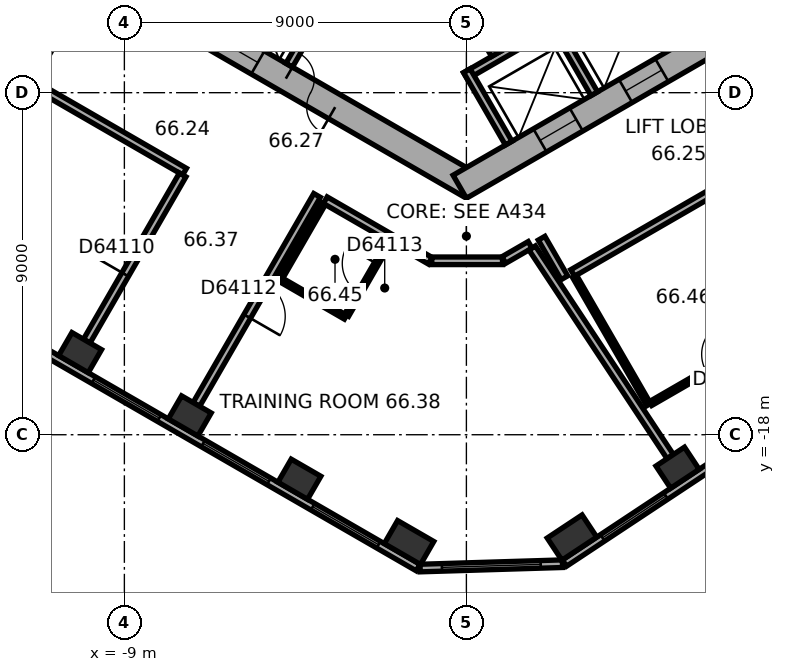
"""IFC4 building model, lengths in metres.
Left out: names, types, materials, properties, quantities, classifications, styles, units other than length and angle.
Written with IfcOpenShell. Run it as: python <this file> out.ifc"""

import sys

from ifc_helpers import new_model, si_unit, direction, frame, frame_2d, origin, origin_2d, place, context, subcontext, project, spatial, rectangle, extrude, element, fill, save


model = new_model("IFC4")
c1 = context("Model", 3, precision=1e-05, world=origin(), true_north=direction((0.0, 1.0)))
c2 = subcontext(c1, "Body", "Model", "MODEL_VIEW")
j1 = project(units=[si_unit("LENGTHUNIT", "METRE"), si_unit("PLANEANGLEUNIT", "RADIAN")], contexts=[c1])
p1 = place(None, origin())
s1 = spatial("IfcSite", under=j1, at=p1, CompositionType="ELEMENT")
p2 = place(p1, origin())
s2 = spatial("IfcBuilding", under=s1, at=p2, CompositionType="ELEMENT")
p3 = place(p2, frame((0.0, 0.0, 267.2)))
s3 = spatial("IfcBuildingStorey", under=s2, at=p3, CompositionType="ELEMENT", Elevation=267.2)
for number, where, z_axis, x_axis in (
    (1, (-10.165, -15.84, 0.0), (0.0, 0.0, 1.0), (0.866, -0.5, 0.0)),
    (2, (-7.28, -17.505, 0.0), (0.0, 0.0, 1.0), (0.866, -0.5, 0.0)),
    (3, (-4.395, -19.171, 0.0), (0.0, 0.0, 1.0), (0.866, -0.5, 0.0)),
):
    element("IfcColumn", number, at=place(p3, frame(where, z_axis=z_axis, x_axis=x_axis)), inside=s3, PredefinedType="COLUMN", context=c2, shape_type="SweptSolid", body=[
        extrude(rectangle(XDim=0.9, YDim=0.7, at=origin_2d()), origin(), (0.0, 0.0, 1.0), 3.7),
    ])
for number, where, z_axis, x_axis in (
    (4, (-1.509, -20.837, 0.0), (0.0, 0.0, 1.0), (0.866, -0.5, 0.0)),
    (5, (2.778, -20.706, 0.0), (0.0, 0.0, 1.0), (0.834, 0.552, 0.0)),
):
    element("IfcColumn", number, at=place(p3, frame(where, z_axis=z_axis, x_axis=x_axis)), inside=s3, PredefinedType="COLUMN", context=c2, shape_type="SweptSolid", body=[
        extrude(rectangle(XDim=1.1, YDim=0.7, at=origin_2d()), origin(), (0.0, 0.0, 1.0), 3.7),
    ])
p4 = place(p3, frame((5.557, -18.867, 0.0), z_axis=(0.0, 0.0, 1.0), x_axis=(0.833885822067, 0.551936985312, 0.0)))
e6 = element("IfcColumn", 6, at=p4, inside=s3, PredefinedType="COLUMN", context=c2, shape_type="SweptSolid", body=[
    extrude(rectangle(XDim=0.9, YDim=0.7, at=origin_2d()), origin(), (0.0, 0.0, 1.0), 3.7),
])
p5 = place(p3, frame((-10.025, -5.586, 0.0), z_axis=(0.0, 0.0, 1.0), x_axis=(0.866026453023, -0.499998182661, 0.0)))
e7 = element("IfcWall", 7, at=p5, inside=s3, PredefinedType="SHEAR", context=c2, shape_type="SweptSolid", body=[
    extrude(rectangle(XDim=11.778, YDim=0.7, at=frame_2d((5.889, 0.0))), origin(), (0.0, 0.0, 1.0), 3.7),
])
p6 = place(p5, frame((6.089, 0.0, 0.0)))
e8 = element("IfcOpeningElement", 8, at=p6, cuts=e7, PredefinedType="OPENING", context=c2, shape_type="SweptSolid", body=[
    extrude(rectangle(XDim=1.5, YDim=2.1, at=frame_2d((0.75, 1.05))), frame((0.0, 0.36, 0.0), z_axis=(0.0, -1.0, 0.0), x_axis=(1.0, 0.0, 0.0)), (0.0, 0.0, 1.0), 0.72),
])
p7 = place(p5, frame((1.539, 0.0, 0.0)))
e9 = element("IfcOpeningElement", 9, at=p7, cuts=e7, PredefinedType="OPENING", context=c2, shape_type="SweptSolid", body=[
    extrude(rectangle(XDim=1.1, YDim=2.1, at=frame_2d((0.55, 1.05))), frame((0.0, 0.36, 0.0), z_axis=(0.0, -1.0, 0.0), x_axis=(1.0, 0.0, 0.0)), (0.0, 0.0, 1.0), 0.72),
])
p8 = place(p5, frame((4.139, 0.0, 0.0)))
e10 = element("IfcOpeningElement", 10, at=p8, cuts=e7, PredefinedType="OPENING", context=c2, shape_type="SweptSolid", body=[
    extrude(rectangle(XDim=1.1, YDim=2.1, at=frame_2d((0.55, 1.05))), frame((0.0, 0.36, 0.0), z_axis=(0.0, -1.0, 0.0), x_axis=(1.0, 0.0, 0.0)), (0.0, 0.0, 1.0), 0.72),
])
p9 = place(p3, frame((-0.175, -11.475, 0.0), z_axis=(0.0, 0.0, 1.0), x_axis=(0.866026453023, 0.499998182661, 0.0)))
e11 = element("IfcWall", 11, at=p9, inside=s3, PredefinedType="SHEAR", context=c2, shape_type="SweptSolid", body=[
    extrude(rectangle(XDim=11.778, YDim=0.7, at=frame_2d((5.889, 0.0))), origin(), (0.0, 0.0, 1.0), 3.7),
])
p10 = place(p9, frame((2.439, 0.0, 0.0)))
e12 = element("IfcOpeningElement", 12, at=p10, cuts=e11, PredefinedType="OPENING", context=c2, shape_type="SweptSolid", body=[
    extrude(rectangle(XDim=1.1, YDim=2.1, at=frame_2d((0.55, 1.05))), frame((0.0, 0.36, 0.0), z_axis=(0.0, -1.0, 0.0), x_axis=(1.0, 0.0, 0.0)), (0.0, 0.0, 1.0), 0.72),
])
p11 = place(p9, frame((5.039, 0.0, 0.0)))
e13 = element("IfcOpeningElement", 13, at=p11, cuts=e11, PredefinedType="OPENING", context=c2, shape_type="SweptSolid", body=[
    extrude(rectangle(XDim=1.1, YDim=2.1, at=frame_2d((0.55, 1.05))), frame((0.0, 0.36, 0.0), z_axis=(0.0, -1.0, 0.0), x_axis=(1.0, 0.0, 0.0)), (0.0, 0.0, 1.0), 0.72),
])
p12 = place(p9, frame((7.639, 0.0, 0.0)))
e14 = element("IfcOpeningElement", 14, at=p12, cuts=e11, PredefinedType="OPENING", context=c2, shape_type="SweptSolid", body=[
    extrude(rectangle(XDim=1.1, YDim=2.1, at=frame_2d((0.55, 1.05))), frame((0.0, 0.36, 0.0), z_axis=(0.0, -1.0, 0.0), x_axis=(1.0, 0.0, 0.0)), (0.0, 0.0, 1.0), 0.72),
])
p13 = place(p3, frame((-16.626, -12.629, 0.0), z_axis=(0.0, 0.0, 1.0), x_axis=(0.866026460444, -0.499998169808, 0.0)))
e15 = element("IfcWall", 15, at=p13, inside=s3, PredefinedType="STANDARD", context=c2, shape_type="SweptSolid", body=[
    extrude(rectangle(XDim=17.731, YDim=0.2, at=frame_2d((8.866, 0.0))), origin(), (0.0, 0.0, 1.0), 3.7),
])
p14 = place(p13, frame((1.203, 0.0, 0.9)))
e16 = element("IfcOpeningElement", 16, at=p14, cuts=e15, PredefinedType="OPENING", context=c2, shape_type="SweptSolid", body=[
    extrude(rectangle(XDim=2.0, YDim=2.0, at=frame_2d((1.0, 1.0))), frame((0.0, 0.11, 0.0), z_axis=(0.0, -1.0, 0.0), x_axis=(1.0, 0.0, 0.0)), (0.0, 0.0, 1.0), 0.22),
])
p15 = place(p13, frame((4.535, 0.0, 0.9)))
e17 = element("IfcOpeningElement", 17, at=p15, cuts=e15, PredefinedType="OPENING", context=c2, shape_type="SweptSolid", body=[
    extrude(rectangle(XDim=2.0, YDim=2.0, at=frame_2d((1.0, 1.0))), frame((0.0, 0.11, 0.0), z_axis=(0.0, -1.0, 0.0), x_axis=(1.0, 0.0, 0.0)), (0.0, 0.0, 1.0), 0.22),
])
p16 = place(p13, frame((7.867, 0.0, 0.9)))
e18 = element("IfcOpeningElement", 18, at=p16, cuts=e15, PredefinedType="OPENING", context=c2, shape_type="SweptSolid", body=[
    extrude(rectangle(XDim=2.0, YDim=2.0, at=frame_2d((1.0, 1.0))), frame((0.0, 0.11, 0.0), z_axis=(0.0, -1.0, 0.0), x_axis=(1.0, 0.0, 0.0)), (0.0, 0.0, 1.0), 0.22),
])
p17 = place(p13, frame((11.198, 0.0, 0.9)))
e19 = element("IfcOpeningElement", 19, at=p17, cuts=e15, PredefinedType="OPENING", context=c2, shape_type="SweptSolid", body=[
    extrude(rectangle(XDim=2.0, YDim=2.0, at=frame_2d((1.0, 1.0))), frame((0.0, 0.11, 0.0), z_axis=(0.0, -1.0, 0.0), x_axis=(1.0, 0.0, 0.0)), (0.0, 0.0, 1.0), 0.22),
])
p18 = place(p13, frame((14.53, 0.0, 0.9)))
e20 = element("IfcOpeningElement", 20, at=p18, cuts=e15, PredefinedType="OPENING", context=c2, shape_type="SweptSolid", body=[
    extrude(rectangle(XDim=2.0, YDim=2.0, at=frame_2d((1.0, 1.0))), frame((0.0, 0.11, 0.0), z_axis=(0.0, -1.0, 0.0), x_axis=(1.0, 0.0, 0.0)), (0.0, 0.0, 1.0), 0.22),
])
p19 = place(p3, frame((-1.217, -21.508, 0.0), z_axis=(0.0, 0.0, 1.0), x_axis=(0.99953295295, 0.030559384285, 0.0)))
e21 = element("IfcWall", 21, at=p19, inside=s3, PredefinedType="STANDARD", context=c2, shape_type="SweptSolid", body=[
    extrude(rectangle(XDim=3.747, YDim=0.2, at=frame_2d((1.874, 0.0))), origin(), (0.0, 0.0, 1.0), 3.7),
])
p20 = place(p19, frame((0.573, 0.0, 0.9)))
e22 = element("IfcOpeningElement", 22, at=p20, cuts=e21, PredefinedType="OPENING", context=c2, shape_type="SweptSolid", body=[
    extrude(rectangle(XDim=2.6, YDim=2.0, at=frame_2d((1.3, 1.0))), frame((0.0, 0.11, 0.0), z_axis=(0.0, -1.0, 0.0), x_axis=(1.0, 0.0, 0.0)), (0.0, 0.0, 1.0), 0.22),
])
p21 = place(p3, frame((2.58, -21.377, 0.0), z_axis=(0.0, 0.0, 1.0), x_axis=(0.833888592176, 0.551932800112, 0.0)))
e23 = element("IfcWall", 23, at=p21, inside=s3, PredefinedType="STANDARD", context=c2, shape_type="SweptSolid", body=[
    extrude(rectangle(XDim=17.731, YDim=0.2, at=frame_2d((8.866, 0.0))), origin(), (0.0, 0.0, 1.0), 3.7),
])
p22 = place(p21, frame((1.202, 0.0, 0.9)))
e24 = element("IfcOpeningElement", 24, at=p22, cuts=e23, PredefinedType="OPENING", context=c2, shape_type="SweptSolid", body=[
    extrude(rectangle(XDim=2.0, YDim=2.0, at=frame_2d((1.0, 1.0))), frame((0.0, 0.11, 0.0), z_axis=(0.0, -1.0, 0.0), x_axis=(1.0, 0.0, 0.0)), (0.0, 0.0, 1.0), 0.22),
])
p23 = place(p21, frame((4.533, 0.0, 0.9)))
e25 = element("IfcOpeningElement", 25, at=p23, cuts=e23, PredefinedType="OPENING", context=c2, shape_type="SweptSolid", body=[
    extrude(rectangle(XDim=2.0, YDim=2.0, at=frame_2d((1.0, 1.0))), frame((0.0, 0.11, 0.0), z_axis=(0.0, -1.0, 0.0), x_axis=(1.0, 0.0, 0.0)), (0.0, 0.0, 1.0), 0.22),
])
p24 = place(p21, frame((7.865, 0.0, 0.9)))
e26 = element("IfcOpeningElement", 26, at=p24, cuts=e23, PredefinedType="OPENING", context=c2, shape_type="SweptSolid", body=[
    extrude(rectangle(XDim=2.0, YDim=2.0, at=frame_2d((1.0, 1.0))), frame((0.0, 0.11, 0.0), z_axis=(0.0, -1.0, 0.0), x_axis=(1.0, 0.0, 0.0)), (0.0, 0.0, 1.0), 0.22),
])
p25 = place(p21, frame((11.197, 0.0, 0.9)))
e27 = element("IfcOpeningElement", 27, at=p25, cuts=e23, PredefinedType="OPENING", context=c2, shape_type="SweptSolid", body=[
    extrude(rectangle(XDim=2.0, YDim=2.0, at=frame_2d((1.0, 1.0))), frame((0.0, 0.11, 0.0), z_axis=(0.0, -1.0, 0.0), x_axis=(1.0, 0.0, 0.0)), (0.0, 0.0, 1.0), 0.22),
])
p26 = place(p21, frame((14.528, 0.0, 0.9)))
e28 = element("IfcOpeningElement", 28, at=p26, cuts=e23, PredefinedType="OPENING", context=c2, shape_type="SweptSolid", body=[
    extrude(rectangle(XDim=2.0, YDim=2.0, at=frame_2d((1.0, 1.0))), frame((0.0, 0.11, 0.0), z_axis=(0.0, -1.0, 0.0), x_axis=(1.0, 0.0, 0.0)), (0.0, 0.0, 1.0), 0.22),
])
p27 = place(p3, frame((-3.563, -6.372, 0.0), z_axis=(0.0, 0.0, 1.0), x_axis=(-0.499994660107, -0.866028486751, 0.0)))
e29 = element("IfcWall", 29, at=p27, inside=s3, PredefinedType="PARTITIONING", context=c2, shape_type="SweptSolid", body=[
    extrude(rectangle(XDim=2.2, YDim=0.2, at=frame_2d((1.1, 0.0))), origin(), (0.0, 0.0, 1.0), 3.42),
])
p28 = place(p3, frame((-0.024, -8.559, 0.0), z_axis=(0.0, 0.0, 1.0), x_axis=(0.866026010844, 0.49999894854, 0.0)))
e30 = element("IfcWall", 30, at=p28, inside=s3, PredefinedType="PARTITIONING", context=c2, shape_type="SweptSolid", body=[
    extrude(rectangle(XDim=8.0, YDim=0.2, at=frame_2d((4.0, 0.0))), origin(), (0.0, 0.0, 1.0), 3.42),
])
for number, where, z_axis, x_axis in (
    (31, (0.013, -8.422, 0.0), (0.0, 0.0, 1.0), (0.5, -0.866, 0.0)),
    (32, (2.264, -7.122, 0.0), (0.0, 0.0, 1.0), (0.5, -0.866, 0.0)),
):
    element("IfcWall", number, at=place(p3, frame(where, z_axis=z_axis, x_axis=x_axis)), inside=s3, PredefinedType="PARTITIONING", context=c2, shape_type="SweptSolid", body=[
        extrude(rectangle(XDim=2.2, YDim=0.2, at=frame_2d((1.1, 0.0))), origin(), (0.0, 0.0, 1.0), 3.42),
    ])
p29 = place(p3, frame((-1.558, -3.902, 0.0), z_axis=(0.0, 0.0, 1.0), x_axis=(0.499977259774, -0.866038532462, 0.0)))
e33 = element("IfcWall", 33, at=p29, inside=s3, PredefinedType="SHEAR", context=c2, shape_type="SweptSolid", body=[
    extrude(rectangle(XDim=4.7, YDim=0.3, at=frame_2d((2.35, 0.0))), origin(), (0.0, 0.0, 1.0), 3.42),
])
p30 = place(p29, frame((0.8, 0.0, 0.0)))
e34 = element("IfcOpeningElement", 34, at=p30, cuts=e33, PredefinedType="OPENING", context=c2, shape_type="SweptSolid", body=[
    extrude(rectangle(XDim=1.2, YDim=2.1, at=frame_2d((0.6, 1.05))), frame((0.0, 0.16, 0.0), z_axis=(0.0, -1.0, 0.0), x_axis=(1.0, 0.0, 0.0)), (0.0, 0.0, 1.0), 0.32),
])
p31 = place(p3, frame((-11.501, -8.719, 0.0), z_axis=(0.0, 0.0, 1.0), x_axis=(0.866024434742, -0.500001678427, 0.0)))
e35 = element("IfcWall", 35, at=p31, inside=s3, PredefinedType="PARTITIONING", context=c2, shape_type="SweptSolid", body=[
    extrude(rectangle(XDim=4.718, YDim=0.2, at=frame_2d((2.359, 0.0))), origin(), (0.0, 0.0, 1.0), 3.42),
])
p32 = place(p3, frame((-10.901, -7.678, 0.0), z_axis=(0.0, 0.0, 1.0), x_axis=(-0.500074377092, -0.865982457891, 0.0)))
e36 = element("IfcWall", 36, at=p32, inside=s3, PredefinedType="PARTITIONING", context=c2, shape_type="SweptSolid", body=[
    extrude(rectangle(XDim=1.101, YDim=0.2, at=frame_2d((0.55, 0.0))), origin(), (0.0, 0.0, 1.0), 3.42),
])
p33 = place(p3, frame((-9.99, -15.537, 0.0), z_axis=(0.0, 0.0, 1.0), x_axis=(0.499966611936, 0.866044679534, 0.0)))
e37 = element("IfcWall", 37, at=p33, inside=s3, PredefinedType="PARTITIONING", context=c2, shape_type="SweptSolid", body=[
    extrude(rectangle(XDim=5.049, YDim=0.2, at=frame_2d((2.524, 0.0))), origin(), (0.0, 0.0, 1.0), 2.87),
])
p34 = place(p33, frame((2.024, 0.0, 0.0)))
e38 = element("IfcOpeningElement", 38, at=p34, cuts=e37, PredefinedType="OPENING", context=c2, shape_type="SweptSolid", body=[
    extrude(rectangle(XDim=1.0, YDim=2.1, at=frame_2d((0.5, 1.05))), frame((0.0, 0.11, 0.0), z_axis=(0.0, -1.0, 0.0), x_axis=(1.0, 0.0, 0.0)), (0.0, 0.0, 1.0), 0.22),
])
p35 = place(p3, frame((-7.105, -17.202, 0.0), z_axis=(0.0, 0.0, 1.0), x_axis=(0.499988692146, 0.866031932279, 0.0)))
e39 = element("IfcWall", 39, at=p35, inside=s3, PredefinedType="PARTITIONING", context=c2, shape_type="SweptSolid", body=[
    extrude(rectangle(XDim=6.35, YDim=0.2, at=frame_2d((3.175, 0.0))), origin(), (0.0, 0.0, 1.0), 3.42),
])
p36 = place(p35, frame((2.675, 0.0, 0.0)))
e40 = element("IfcOpeningElement", 40, at=p36, cuts=e39, PredefinedType="OPENING", context=c2, shape_type="SweptSolid", body=[
    extrude(rectangle(XDim=1.0, YDim=2.1, at=frame_2d((0.5, 1.05))), frame((0.0, 0.11, 0.0), z_axis=(0.0, -1.0, 0.0), x_axis=(1.0, 0.0, 0.0)), (0.0, 0.0, 1.0), 0.22),
])
p37 = place(p3, frame((-4.913, -13.906, 0.0), z_axis=(0.0, 0.0, 1.0), x_axis=(0.500031774688, 0.866007057882, 0.0)))
e41 = element("IfcWall", 41, at=p37, inside=s3, PredefinedType="PARTITIONING", context=c2, shape_type="SweptSolid", body=[
    extrude(rectangle(XDim=2.3, YDim=0.12, at=frame_2d((1.15, 0.0))), origin(), (0.0, 0.0, 1.0), 3.42),
])
p38 = place(p3, frame((-3.713, -11.828, 0.0), z_axis=(0.0, 0.0, 1.0), x_axis=(0.866026321388, -0.499998410661, 0.0)))
e42 = element("IfcWall", 42, at=p38, inside=s3, PredefinedType="PARTITIONING", context=c2, shape_type="SweptSolid", body=[
    extrude(rectangle(XDim=3.191, YDim=0.2, at=frame_2d((1.595, 0.0))), origin(), (0.0, 0.0, 1.0), 3.42),
])
p39 = place(p3, frame((-3.181, -14.906, 0.0), z_axis=(0.0, 0.0, 1.0), x_axis=(-0.866043088465, 0.499969367985, 0.0)))
e43 = element("IfcWall", 43, at=p39, inside=s3, PredefinedType="PARTITIONING", context=c2, shape_type="SweptSolid", body=[
    extrude(rectangle(XDim=1.94, YDim=0.12, at=frame_2d((0.97, 0.0))), origin(), (0.0, 0.0, 1.0), 3.42),
])
p40 = place(p3, frame((-2.031, -12.915, 0.0), z_axis=(0.0, 0.0, 1.0), x_axis=(-0.49994888933, -0.866054910533, 0.0)))
e44 = element("IfcWall", 44, at=p40, inside=s3, PredefinedType="PARTITIONING", context=c2, shape_type="SweptSolid", body=[
    extrude(rectangle(XDim=2.24, YDim=0.12, at=frame_2d((1.12, 0.0))), origin(), (0.0, 0.0, 1.0), 3.42),
])
p41 = place(p40, frame((0.67, 0.0, 0.0)))
e45 = element("IfcOpeningElement", 45, at=p41, cuts=e44, PredefinedType="OPENING", context=c2, shape_type="SweptSolid", body=[
    extrude(rectangle(XDim=0.9, YDim=2.1, at=frame_2d((0.45, 1.05))), frame((0.0, 0.07, 0.0), z_axis=(0.0, -1.0, 0.0), x_axis=(1.0, 0.0, 0.0)), (0.0, 0.0, 1.0), 0.14),
])
p42 = place(p3, frame((-0.91, -13.423, 0.0), z_axis=(0.0, 0.0, 1.0), x_axis=(1.0, 0.0, 0.0)))
e46 = element("IfcWall", 46, at=p42, inside=s3, PredefinedType="PARTITIONING", context=c2, shape_type="SweptSolid", body=[
    extrude(rectangle(XDim=1.86, YDim=0.2, at=frame_2d((0.93, 0.0))), origin(), (0.0, 0.0, 1.0), 3.42),
])
p43 = place(p3, frame((0.985, -13.403, 0.0), z_axis=(0.0, 0.0, 1.0), x_axis=(0.866032814021, 0.499987164874, 0.0)))
e47 = element("IfcWall", 47, at=p43, inside=s3, PredefinedType="PARTITIONING", context=c2, shape_type="SweptSolid", body=[
    extrude(rectangle(XDim=0.798, YDim=0.2, at=frame_2d((0.399, 0.0))), origin(), (0.0, 0.0, 1.0), 3.42),
])
p44 = place(p3, frame((1.979, -12.829, 0.0), z_axis=(0.0, 0.0, 1.0), x_axis=(0.500074377092, -0.865982457891, 0.0)))
e48 = element("IfcWall", 48, at=p44, inside=s3, PredefinedType="PARTITIONING", context=c2, shape_type="SweptSolid", body=[
    extrude(rectangle(XDim=1.201, YDim=0.2, at=frame_2d((0.601, 0.0))), origin(), (0.0, 0.0, 1.0), 3.42),
])
p45 = place(p3, frame((2.796, -13.744, 0.0), z_axis=(0.0, 0.0, 1.0), x_axis=(0.866018331238, 0.50001224981, 0.0)))
e49 = element("IfcWall", 49, at=p45, inside=s3, PredefinedType="PARTITIONING", context=c2, shape_type="SweptSolid", body=[
    extrude(rectangle(XDim=4.4, YDim=0.2, at=frame_2d((2.2, 0.0))), origin(), (0.0, 0.0, 1.0), 3.42),
])
p46 = place(p3, frame((4.796, -17.208, 0.0), z_axis=(0.0, 0.0, 1.0), x_axis=(-0.500043961785, 0.866000020948, 0.0)))
e50 = element("IfcWall", 50, at=p46, inside=s3, PredefinedType="PARTITIONING", context=c2, shape_type="SweptSolid", body=[
    extrude(rectangle(XDim=3.9, YDim=0.12, at=frame_2d((1.95, 0.0))), origin(), (0.0, 0.0, 1.0), 3.42),
])
p47 = place(p3, frame((5.364, -18.575, 0.0), z_axis=(0.0, 0.0, 1.0), x_axis=(-0.55195757761, 0.833872191957, 0.0)))
e51 = element("IfcWall", 51, at=p47, inside=s3, PredefinedType="PARTITIONING", context=c2, shape_type="SweptSolid", body=[
    extrude(rectangle(XDim=6.581, YDim=0.2, at=frame_2d((3.291, 0.0))), origin(), (0.0, 0.0, 1.0), 3.42),
])
p48 = place(p3, frame((8.554, -15.039, 0.0), z_axis=(0.0, 0.0, 1.0), x_axis=(-0.865994635417, -0.500053288589, 0.0)))
e52 = element("IfcWall", 52, at=p48, inside=s3, PredefinedType="PARTITIONING", context=c2, shape_type="SweptSolid", body=[
    extrude(rectangle(XDim=4.28, YDim=0.12, at=frame_2d((2.14, 0.0))), origin(), (0.0, 0.0, 1.0), 3.42),
])
p49 = place(p48, frame((1.69, 0.0, 0.0)))
e53 = element("IfcOpeningElement", 53, at=p49, cuts=e52, PredefinedType="OPENING", context=c2, shape_type="SweptSolid", body=[
    extrude(rectangle(XDim=0.9, YDim=2.1, at=frame_2d((0.45, 1.05))), frame((0.0, 0.07, 0.0), z_axis=(0.0, -1.0, 0.0), x_axis=(1.0, 0.0, 0.0)), (0.0, 0.0, 1.0), 0.14),
])
p50 = place(p16, origin())
e54 = element("IfcWindow", 54, at=p50, inside=s3, PartitioningType="SINGLE_PANEL", PredefinedType="WINDOW", context=c2, shape_type="SweptSolid", body=[
    extrude(rectangle(XDim=2.0, YDim=2.0, at=frame_2d((1.0, 1.0))), frame((0.0, 0.03, 0.0), z_axis=(0.0, -1.0, 0.0), x_axis=(1.0, 0.0, 0.0)), (0.0, 0.0, 1.0), 0.06),
])
fill(e18, e54)
p51 = place(p17, origin())
e55 = element("IfcWindow", 55, at=p51, inside=s3, PartitioningType="SINGLE_PANEL", PredefinedType="WINDOW", context=c2, shape_type="SweptSolid", body=[
    extrude(rectangle(XDim=2.0, YDim=2.0, at=frame_2d((1.0, 1.0))), frame((0.0, 0.03, 0.0), z_axis=(0.0, -1.0, 0.0), x_axis=(1.0, 0.0, 0.0)), (0.0, 0.0, 1.0), 0.06),
])
fill(e19, e55)
p52 = place(p18, origin())
e56 = element("IfcWindow", 56, at=p52, inside=s3, PartitioningType="SINGLE_PANEL", PredefinedType="WINDOW", context=c2, shape_type="SweptSolid", body=[
    extrude(rectangle(XDim=2.0, YDim=2.0, at=frame_2d((1.0, 1.0))), frame((0.0, 0.03, 0.0), z_axis=(0.0, -1.0, 0.0), x_axis=(1.0, 0.0, 0.0)), (0.0, 0.0, 1.0), 0.06),
])
fill(e20, e56)
p53 = place(p20, origin())
e57 = element("IfcWindow", 57, at=p53, inside=s3, PartitioningType="SINGLE_PANEL", PredefinedType="WINDOW", context=c2, shape_type="SweptSolid", body=[
    extrude(rectangle(XDim=2.6, YDim=2.0, at=frame_2d((1.3, 1.0))), frame((0.0, 0.03, 0.0), z_axis=(0.0, -1.0, 0.0), x_axis=(1.0, 0.0, 0.0)), (0.0, 0.0, 1.0), 0.06),
])
fill(e22, e57)
p54 = place(p22, origin())
e58 = element("IfcWindow", 58, at=p54, inside=s3, PartitioningType="SINGLE_PANEL", PredefinedType="WINDOW", context=c2, shape_type="SweptSolid", body=[
    extrude(rectangle(XDim=2.0, YDim=2.0, at=frame_2d((1.0, 1.0))), frame((0.0, 0.03, 0.0), z_axis=(0.0, -1.0, 0.0), x_axis=(1.0, 0.0, 0.0)), (0.0, 0.0, 1.0), 0.06),
])
fill(e24, e58)
p55 = place(p6, origin())
e59 = element("IfcDoor", 59, at=p55, inside=s3, OperationType="DOUBLE_DOOR_SINGLE_SWING", PredefinedType="DOOR", context=c2, shape_type="SweptSolid", body=[
    extrude(rectangle(XDim=1.5, YDim=2.1, at=frame_2d((0.75, 1.05))), frame((0.0, 0.025, 0.0), z_axis=(0.0, -1.0, 0.0), x_axis=(1.0, 0.0, 0.0)), (0.0, 0.0, 1.0), 0.05),
])
fill(e8, e59)
p56 = place(p8, origin())
e60 = element("IfcDoor", 60, at=p56, inside=s3, OperationType="DOUBLE_DOOR_SLIDING", PredefinedType="DOOR", context=c2, shape_type="SweptSolid", body=[
    extrude(rectangle(XDim=1.1, YDim=2.1, at=frame_2d((0.55, 1.05))), frame((0.0, 0.025, 0.0), z_axis=(0.0, -1.0, 0.0), x_axis=(1.0, 0.0, 0.0)), (0.0, 0.0, 1.0), 0.05),
])
fill(e10, e60)
p57 = place(p10, origin())
e61 = element("IfcDoor", 61, at=p57, inside=s3, OperationType="DOUBLE_DOOR_SLIDING", PredefinedType="DOOR", context=c2, shape_type="SweptSolid", body=[
    extrude(rectangle(XDim=1.1, YDim=2.1, at=frame_2d((0.55, 1.05))), frame((0.0, 0.025, 0.0), z_axis=(0.0, -1.0, 0.0), x_axis=(1.0, 0.0, 0.0)), (0.0, 0.0, 1.0), 0.05),
])
fill(e12, e61)
p58 = place(p11, origin())
e62 = element("IfcDoor", 62, at=p58, inside=s3, OperationType="DOUBLE_DOOR_SLIDING", PredefinedType="DOOR", context=c2, shape_type="SweptSolid", body=[
    extrude(rectangle(XDim=1.1, YDim=2.1, at=frame_2d((0.55, 1.05))), frame((0.0, 0.025, 0.0), z_axis=(0.0, -1.0, 0.0), x_axis=(1.0, 0.0, 0.0)), (0.0, 0.0, 1.0), 0.05),
])
fill(e13, e62)
p59 = place(p34, origin())
e63 = element("IfcDoor", 63, at=p59, inside=s3, OperationType="SINGLE_SWING_LEFT", PredefinedType="DOOR", context=c2, shape_type="SweptSolid", body=[
    extrude(rectangle(XDim=1.0, YDim=2.1, at=frame_2d((0.5, 1.05))), frame((0.0, 0.025, 0.0), z_axis=(0.0, -1.0, 0.0), x_axis=(1.0, 0.0, 0.0)), (0.0, 0.0, 1.0), 0.05),
])
fill(e38, e63)
p60 = place(p36, origin())
e64 = element("IfcDoor", 64, at=p60, inside=s3, OperationType="SINGLE_SWING_LEFT", PredefinedType="DOOR", context=c2, shape_type="SweptSolid", body=[
    extrude(rectangle(XDim=1.0, YDim=2.1, at=frame_2d((0.5, 1.05))), frame((0.0, 0.025, 0.0), z_axis=(0.0, -1.0, 0.0), x_axis=(1.0, 0.0, 0.0)), (0.0, 0.0, 1.0), 0.05),
])
fill(e40, e64)
p61 = place(p41, origin())
e65 = element("IfcDoor", 65, at=p61, inside=s3, OperationType="SINGLE_SWING_LEFT", PredefinedType="DOOR", context=c2, shape_type="SweptSolid", body=[
    extrude(rectangle(XDim=0.9, YDim=2.1, at=frame_2d((0.45, 1.05))), frame((0.0, 0.025, 0.0), z_axis=(0.0, -1.0, 0.0), x_axis=(1.0, 0.0, 0.0)), (0.0, 0.0, 1.0), 0.05),
])
fill(e45, e65)
save(model, sys.argv[1])
